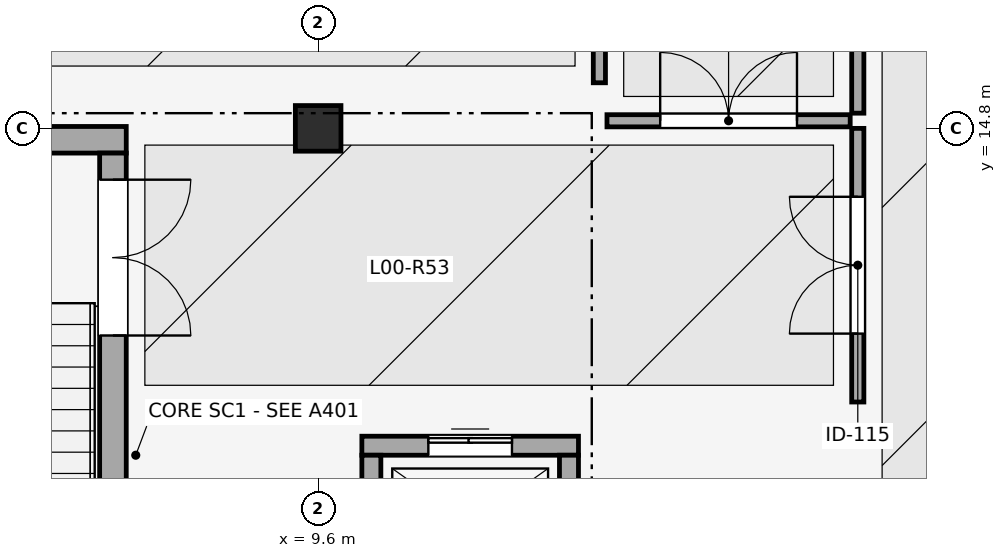
"""IFC4 building model, lengths in metres.
Left out: names, types, materials, properties, quantities, classifications, styles, units other than length and angle.
Written with IfcOpenShell. Run it as: python <this file> out.ifc"""

import sys

from ifc_helpers import new_model, si_unit, direction, frame, frame_2d, origin, origin_2d, place, context, subcontext, project, spatial, rectangle, extrude, element, fill, save


model = new_model("IFC4")
c1 = context("Model", 3, precision=1e-05, world=origin(), true_north=direction((0.0, 1.0)))
c2 = subcontext(c1, "Body", "Model", "MODEL_VIEW")
j1 = project(units=[si_unit("LENGTHUNIT", "METRE"), si_unit("PLANEANGLEUNIT", "RADIAN")], contexts=[c1])
p1 = place(None, origin())
s1 = spatial("IfcSite", under=j1, at=p1, CompositionType="ELEMENT")
p2 = place(p1, origin())
s2 = spatial("IfcBuilding", under=s1, at=p2, CompositionType="ELEMENT")
p3 = place(p2, origin())
s3 = spatial("IfcBuildingStorey", under=s2, at=p3, CompositionType="ELEMENT", Elevation=0.0)
p4 = place(p3, frame((9.6, 14.8, 0.0), z_axis=(0.0, 0.0, 1.0), x_axis=(1.0, 0.0, 0.0)))
e1 = element("IfcColumn", 1, at=p4, inside=s3, PredefinedType="COLUMN", context=c2, shape_type="SweptSolid", body=[
    extrude(rectangle(XDim=0.6, YDim=0.6, at=origin_2d()), origin(), (0.0, 0.0, 1.0), 4.8),
])
p5 = place(p3, frame((1.425, 14.65, 0.0), z_axis=(0.0, 0.0, 1.0), x_axis=(1.0, 0.0, 0.0)))
e2 = element("IfcWall", 2, at=p5, inside=s3, PredefinedType="SHEAR", context=c2, shape_type="SweptSolid", body=[
    extrude(rectangle(XDim=5.65, YDim=0.35, at=frame_2d((2.825, 0.0))), origin(), (0.0, 0.0, 1.0), 4.55),
])
p6 = place(p3, frame((6.9, 14.475, 0.0), z_axis=(0.0, 0.0, 1.0), x_axis=(0.0, -1.0, 0.0)))
e3 = element("IfcWall", 3, at=p6, inside=s3, PredefinedType="SHEAR", context=c2, shape_type="SweptSolid", body=[
    extrude(rectangle(XDim=7.95, YDim=0.35, at=frame_2d((3.975, 0.0))), origin(), (0.0, 0.0, 1.0), 4.55),
])
p7 = place(p6, frame((0.35, 0.0, 0.0)))
e4 = element("IfcOpeningElement", 4, at=p7, cuts=e3, PredefinedType="OPENING", context=c2, shape_type="SweptSolid", body=[
    extrude(rectangle(XDim=2.05, YDim=2.15, at=frame_2d((1.025, 1.075))), frame((0.0, 0.185, 0.0), z_axis=(0.0, -1.0, 0.0), x_axis=(1.0, 0.0, 0.0)), (0.0, 0.0, 1.0), 0.37),
])
p8 = place(p3, frame((10.175, 10.625, -1.5), z_axis=(0.0, 0.0, 1.0), x_axis=(1.0, 0.0, 0.0)))
e5 = element("IfcWall", 5, at=p8, inside=s3, PredefinedType="SOLIDWALL", context=c2, shape_type="SweptSolid", body=[
    extrude(rectangle(XDim=2.85, YDim=0.25, at=frame_2d((1.425, 0.0))), origin(), (0.0, 0.0, 1.0), 6.05),
])
p9 = place(p8, frame((0.875, 0.0, 1.5)))
e6 = element("IfcOpeningElement", 6, at=p9, cuts=e5, PredefinedType="OPENING", context=c2, shape_type="SweptSolid", body=[
    extrude(rectangle(XDim=1.1, YDim=2.15, at=frame_2d((0.55, 1.075))), frame((0.0, 0.135, 0.0), z_axis=(0.0, -1.0, 0.0), x_axis=(1.0, 0.0, 0.0)), (0.0, 0.0, 1.0), 0.27),
])
for number, where, z_axis, x_axis in (
    (7, (10.3, 8.7, -1.5), (0.0, 0.0, 1.0), (0.0, 1.0, 0.0)),
    (8, (12.9, 10.5, -1.5), (0.0, 0.0, 1.0), (0.0, -1.0, 0.0)),
):
    element("IfcWall", number, at=place(p3, frame(where, z_axis=z_axis, x_axis=x_axis)), inside=s3, PredefinedType="SOLIDWALL", context=c2, shape_type="SweptSolid", body=[
        extrude(rectangle(XDim=1.8, YDim=0.25, at=frame_2d((0.9, 0.0))), origin(), (0.0, 0.0, 1.0), 6.05),
    ])
p10 = place(p3, frame((16.7, 11.2, 0.0), z_axis=(0.0, 0.0, 1.0), x_axis=(0.0, 1.0, 0.0)))
e9 = element("IfcWall", 9, at=p10, inside=s3, PredefinedType="PARTITIONING", context=c2, shape_type="SweptSolid", body=[
    extrude(rectangle(XDim=3.6, YDim=0.16, at=frame_2d((1.8, 0.0))), origin(), (0.0, 0.0, 1.0), 4.42),
])
p11 = place(p10, frame((0.9, 0.0, 0.0)))
e10 = element("IfcOpeningElement", 10, at=p11, cuts=e9, PredefinedType="OPENING", context=c2, shape_type="SweptSolid", body=[
    extrude(rectangle(XDim=1.8, YDim=2.15, at=frame_2d((0.9, 1.075))), frame((0.0, 0.09, 0.0), z_axis=(0.0, -1.0, 0.0), x_axis=(1.0, 0.0, 0.0)), (0.0, 0.0, 1.0), 0.18),
])
p12 = place(p3, frame((16.7, 15.0, 0.0), z_axis=(0.0, 0.0, 1.0), x_axis=(0.0, 1.0, 0.0)))
e11 = element("IfcWall", 11, at=p12, inside=s3, PredefinedType="PARTITIONING", context=c2, shape_type="SweptSolid", body=[
    extrude(rectangle(XDim=13.3, YDim=0.16, at=frame_2d((6.65, 0.0))), origin(), (0.0, 0.0, 1.0), 4.42),
])
p13 = place(p12, frame((5.75, 0.0, 0.0)))
e12 = element("IfcOpeningElement", 12, at=p13, cuts=e11, PredefinedType="OPENING", context=c2, shape_type="SweptSolid", body=[
    extrude(rectangle(XDim=1.8, YDim=2.15, at=frame_2d((0.9, 1.075))), frame((0.0, 0.09, 0.0), z_axis=(0.0, -1.0, 0.0), x_axis=(1.0, 0.0, 0.0)), (0.0, 0.0, 1.0), 0.18),
])
p14 = place(p3, frame((13.3, 15.4, 0.0), z_axis=(0.0, 0.0, 1.0), x_axis=(0.0, 1.0, 0.0)))
e13 = element("IfcWall", 13, at=p14, inside=s3, PredefinedType="PARTITIONING", context=c2, shape_type="SweptSolid", body=[
    extrude(rectangle(XDim=11.345, YDim=0.16, at=frame_2d((5.673, 0.0))), origin(), (0.0, 0.0, 1.0), 4.42),
])
p15 = place(p14, frame((4.772, 0.0, 0.0)))
e14 = element("IfcOpeningElement", 14, at=p15, cuts=e13, PredefinedType="OPENING", context=c2, shape_type="SweptSolid", body=[
    extrude(rectangle(XDim=1.8, YDim=2.15, at=frame_2d((0.9, 1.075))), frame((0.0, 0.09, 0.0), z_axis=(0.0, -1.0, 0.0), x_axis=(1.0, 0.0, 0.0)), (0.0, 0.0, 1.0), 0.18),
])
p16 = place(p3, frame((13.4, 14.9, 0.0), z_axis=(0.0, 0.0, 1.0), x_axis=(1.0, 0.0, 0.0)))
e15 = element("IfcWall", 15, at=p16, inside=s3, PredefinedType="PARTITIONING", context=c2, shape_type="SweptSolid", body=[
    extrude(rectangle(XDim=3.2, YDim=0.16, at=frame_2d((1.6, 0.0))), origin(), (0.0, 0.0, 1.0), 3.895),
])
p17 = place(p16, frame((0.7, 0.0, 0.0)))
e16 = element("IfcOpeningElement", 16, at=p17, cuts=e15, PredefinedType="OPENING", context=c2, shape_type="SweptSolid", body=[
    extrude(rectangle(XDim=1.8, YDim=2.15, at=frame_2d((0.9, 1.075))), frame((0.0, 0.09, 0.0), z_axis=(0.0, -1.0, 0.0), x_axis=(1.0, 0.0, 0.0)), (0.0, 0.0, 1.0), 0.18),
])
p18 = place(p7, origin())
e17 = element("IfcDoor", 17, at=p18, inside=s3, OperationType="DOUBLE_DOOR_SINGLE_SWING", PredefinedType="DOOR", context=c2, shape_type="SweptSolid", body=[
    extrude(rectangle(XDim=2.05, YDim=2.15, at=frame_2d((1.025, 1.075))), frame((0.0, 0.025, 0.0), z_axis=(0.0, -1.0, 0.0), x_axis=(1.0, 0.0, 0.0)), (0.0, 0.0, 1.0), 0.05),
])
fill(e4, e17)
p19 = place(p9, origin())
e18 = element("IfcDoor", 18, at=p19, inside=s3, OperationType="DOUBLE_DOOR_SLIDING", PredefinedType="DOOR", context=c2, shape_type="SweptSolid", body=[
    extrude(rectangle(XDim=1.1, YDim=2.15, at=frame_2d((0.55, 1.075))), frame((0.0, 0.025, 0.0), z_axis=(0.0, -1.0, 0.0), x_axis=(1.0, 0.0, 0.0)), (0.0, 0.0, 1.0), 0.05),
])
fill(e6, e18)
p20 = place(p11, origin())
e19 = element("IfcDoor", 19, at=p20, inside=s3, OperationType="DOUBLE_DOOR_SINGLE_SWING", PredefinedType="DOOR", context=c2, shape_type="SweptSolid", body=[
    extrude(rectangle(XDim=1.8, YDim=2.15, at=frame_2d((0.9, 1.075))), frame((0.0, 0.025, 0.0), z_axis=(0.0, -1.0, 0.0), x_axis=(1.0, 0.0, 0.0)), (0.0, 0.0, 1.0), 0.05),
])
fill(e10, e19)
p21 = place(p17, origin())
e20 = element("IfcDoor", 20, at=p21, inside=s3, OperationType="DOUBLE_DOOR_SINGLE_SWING", PredefinedType="DOOR", context=c2, shape_type="SweptSolid", body=[
    extrude(rectangle(XDim=1.8, YDim=2.15, at=frame_2d((0.9, 1.075))), frame((0.0, 0.025, 0.0), z_axis=(0.0, -1.0, 0.0), x_axis=(1.0, 0.0, 0.0)), (0.0, 0.0, 1.0), 0.05),
])
fill(e16, e20)
save(model, sys.argv[1])
